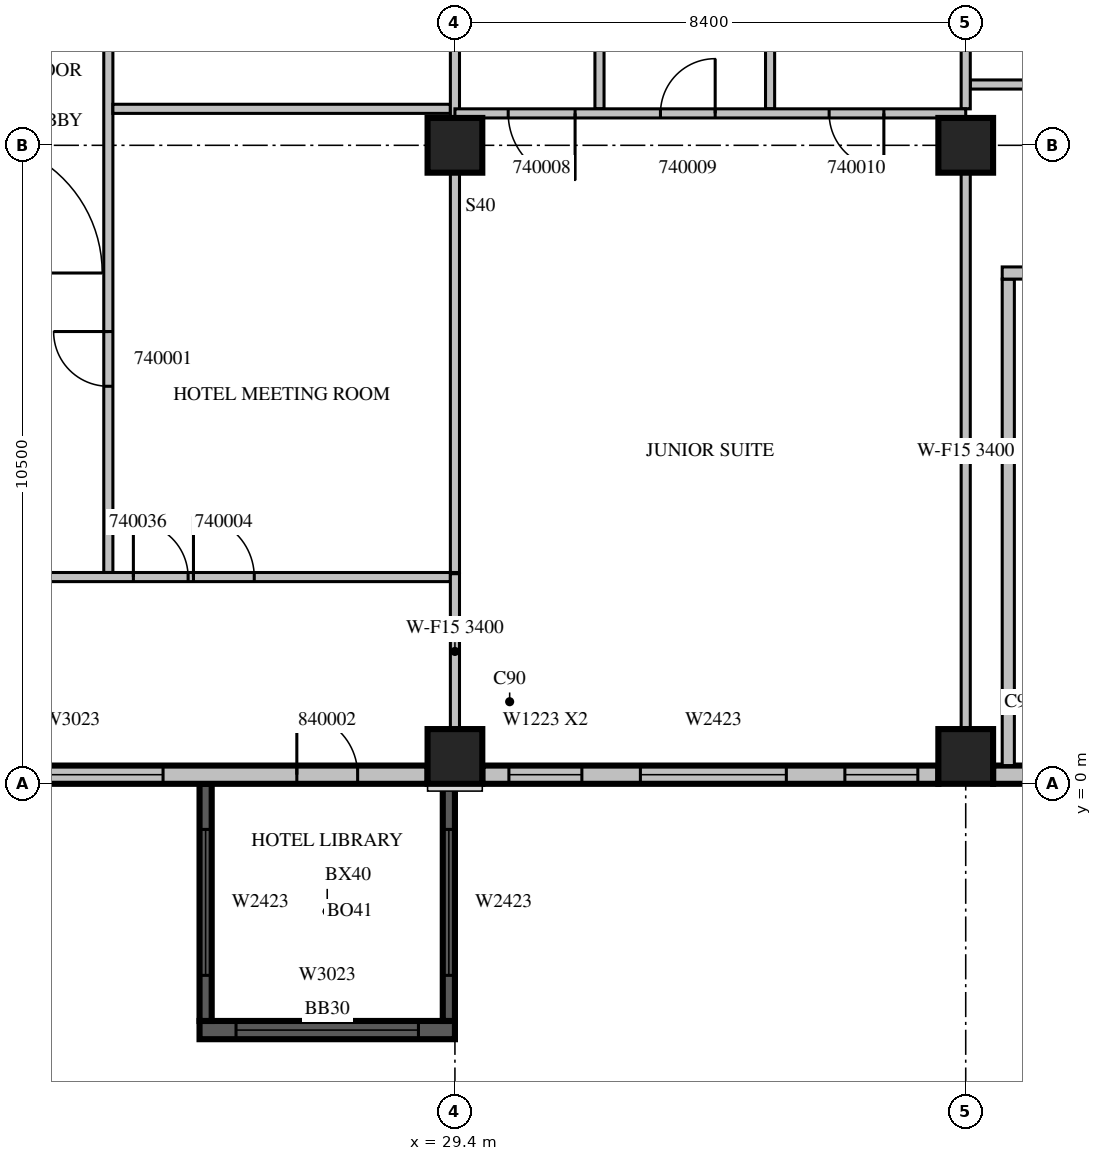
"""IFC4 building model, lengths in metres.
Left out: names, types, materials, properties, quantities, classifications, styles, units other than length and angle.
Written with IfcOpenShell. Run it as: python <this file> out.ifc"""

import sys

from ifc_helpers import new_model, si_unit, direction, frame, frame_2d, origin, origin_2d, place, context, subcontext, project, spatial, rectangle, extrude, source, transform, mapped, element, fill, save


model = new_model("IFC4")
c1 = context("Model", 3, precision=1e-05, world=origin(), true_north=direction((0.0, 1.0)))
c2 = subcontext(c1, "Body", "Model", "MODEL_VIEW")
j1 = project(units=[si_unit("LENGTHUNIT", "METRE"), si_unit("PLANEANGLEUNIT", "RADIAN")], contexts=[c1])
p1 = place(None, origin())
s1 = spatial("IfcSite", under=j1, at=p1, CompositionType="ELEMENT")
p2 = place(p1, origin())
s2 = spatial("IfcBuilding", under=s1, at=p2, CompositionType="ELEMENT")
p3 = place(p2, frame((0.0, 0.0, 185.4)))
s3 = spatial("IfcBuildingStorey", under=s2, at=p3, CompositionType="ELEMENT", Elevation=185.4)
m1 = source(origin(), c2, "Body", "SweptSolid", [
    extrude(rectangle(XDim=0.9, YDim=0.9, at=origin_2d()), origin(), (0.0, 0.0, 1.0), 3.8),
])
for number, where, z_axis, x_axis in (
    (1, (29.4, 0.45, 0.0), (0.0, 0.0, 1.0), (1.0, 0.0, 0.0)),
    (2, (37.8, 0.45, 0.0), (0.0, 0.0, 1.0), (1.0, 0.0, 0.0)),
    (3, (29.4, 10.5, 0.0), (0.0, 0.0, 1.0), (1.0, 0.0, 0.0)),
    (4, (37.8, 10.5, 0.0), (0.0, 0.0, 1.0), (1.0, 0.0, 0.0)),
):
    element("IfcColumn", number, at=place(p3, frame(where, z_axis=z_axis, x_axis=x_axis)), inside=s3, PredefinedType="COLUMN", context=c2, shape_type="MappedRepresentation", body=[
        mapped(m1, transform((0.0, 0.0, 0.0), scale=1.0)),
    ])
m2 = source(origin(), c2, "Body", "SweptSolid", [
    extrude(rectangle(XDim=4.2, YDim=0.3, at=frame_2d((2.1, 0.0))), origin(), (0.0, 0.0, 1.0), 3.4),
])
p4 = place(p3, frame((25.2, -4.05, 0.0), z_axis=(0.0, 0.0, 1.0), x_axis=(1.0, 0.0, 0.0)))
e5 = element("IfcWall", 5, at=p4, inside=s3, PredefinedType="SOLIDWALL", context=c2, shape_type="MappedRepresentation", body=[
    mapped(m2, transform((0.0, 0.0, 0.0), scale=1.0)),
])
m3 = source(origin(), c2, "Body", "SweptSolid", [
    extrude(rectangle(XDim=3.0, YDim=2.3, at=frame_2d((1.5, 1.15))), frame((0.0, 0.16, 0.0), z_axis=(0.0, -1.0, 0.0), x_axis=(1.0, 0.0, 0.0)), (0.0, 0.0, 1.0), 0.32),
])
p5 = place(p4, frame((0.6, 0.0, 0.6)))
e6 = element("IfcOpeningElement", 6, at=p5, cuts=e5, PredefinedType="OPENING", context=c2, shape_type="MappedRepresentation", body=[
    mapped(m3, transform((0.0, 0.0, 0.0), scale=1.0)),
])
m4 = source(origin(), c2, "Body", "SweptSolid", [
    extrude(rectangle(XDim=3.9, YDim=0.2, at=frame_2d((1.95, 0.0))), origin(), (0.0, 0.0, 1.0), 3.4),
])
p6 = place(p3, frame((25.3, 0.0, 0.0), z_axis=(0.0, 0.0, 1.0), x_axis=(0.0, -1.0, 0.0)))
e7 = element("IfcWall", 7, at=p6, inside=s3, PredefinedType="SOLIDWALL", context=c2, shape_type="MappedRepresentation", body=[
    mapped(m4, transform((0.0, 0.0, 0.0), scale=1.0)),
])
m5 = source(origin(), c2, "Body", "SweptSolid", [
    extrude(rectangle(XDim=2.4, YDim=2.3, at=frame_2d((1.2, 1.15))), frame((0.0, 0.11, 0.0), z_axis=(0.0, -1.0, 0.0), x_axis=(1.0, 0.0, 0.0)), (0.0, 0.0, 1.0), 0.22),
])
p7 = place(p6, frame((0.75, 0.0, 0.6)))
e8 = element("IfcOpeningElement", 8, at=p7, cuts=e7, PredefinedType="OPENING", context=c2, shape_type="MappedRepresentation", body=[
    mapped(m5, transform((0.0, 0.0, 0.0), scale=1.0)),
])
p8 = place(p3, frame((29.3, 0.0, 0.0), z_axis=(0.0, 0.0, 1.0), x_axis=(0.0, -1.0, 0.0)))
e9 = element("IfcWall", 9, at=p8, inside=s3, PredefinedType="SOLIDWALL", context=c2, shape_type="MappedRepresentation", body=[
    mapped(m4, transform((0.0, 0.0, 0.0), scale=1.0)),
])
p9 = place(p8, frame((0.75, 0.0, 0.6)))
e10 = element("IfcOpeningElement", 10, at=p9, cuts=e9, PredefinedType="OPENING", context=c2, shape_type="MappedRepresentation", body=[
    mapped(m5, transform((0.0, 0.0, 0.0), scale=1.0)),
])
m6 = source(origin(), c2, "Body", "SweptSolid", [
    extrude(rectangle(XDim=7.5, YDim=0.3, at=frame_2d((3.75, 0.0))), origin(), (0.0, 0.0, 1.0), 3.4),
])
p10 = place(p3, frame((21.45, 0.15, 0.0), z_axis=(0.0, 0.0, 1.0), x_axis=(1.0, 0.0, 0.0)))
e11 = element("IfcWall", 11, at=p10, inside=s3, PredefinedType="STANDARD", context=c2, shape_type="MappedRepresentation", body=[
    mapped(m6, transform((0.0, 0.0, 0.0), scale=1.0)),
])
p11 = place(p10, frame((0.15, 0.0, 0.6)))
e12 = element("IfcOpeningElement", 12, at=p11, cuts=e11, PredefinedType="OPENING", context=c2, shape_type="MappedRepresentation", body=[
    mapped(m3, transform((0.0, 0.0, 0.0), scale=1.0)),
])
m7 = source(origin(), c2, "Body", "SweptSolid", [
    extrude(rectangle(XDim=1.0, YDim=2.1, at=frame_2d((0.5, 1.05))), frame((0.0, 0.16, 0.0), z_axis=(0.0, -1.0, 0.0), x_axis=(1.0, 0.0, 0.0)), (0.0, 0.0, 1.0), 0.32),
])
p12 = place(p10, frame((5.35, 0.0, 0.0)))
e13 = element("IfcOpeningElement", 13, at=p12, cuts=e11, PredefinedType="OPENING", context=c2, shape_type="MappedRepresentation", body=[
    mapped(m7, transform((0.0, 0.0, 0.0), scale=1.0)),
])
p13 = place(p3, frame((29.85, 0.15, 0.0), z_axis=(0.0, 0.0, 1.0), x_axis=(1.0, 0.0, 0.0)))
e14 = element("IfcWall", 14, at=p13, inside=s3, PredefinedType="STANDARD", context=c2, shape_type="MappedRepresentation", body=[
    mapped(m6, transform((0.0, 0.0, 0.0), scale=1.0)),
])
m8 = source(origin(), c2, "Body", "SweptSolid", [
    extrude(rectangle(XDim=1.2, YDim=2.3, at=frame_2d((0.6, 1.15))), frame((0.0, 0.16, 0.0), z_axis=(0.0, -1.0, 0.0), x_axis=(1.0, 0.0, 0.0)), (0.0, 0.0, 1.0), 0.32),
])
p14 = place(p13, frame((0.438, 0.0, 0.6)))
e15 = element("IfcOpeningElement", 15, at=p14, cuts=e14, PredefinedType="OPENING", context=c2, shape_type="MappedRepresentation", body=[
    mapped(m8, transform((0.0, 0.0, 0.0), scale=1.0)),
])
p15 = place(p13, frame((5.963, 0.0, 0.6)))
e16 = element("IfcOpeningElement", 16, at=p15, cuts=e14, PredefinedType="OPENING", context=c2, shape_type="MappedRepresentation", body=[
    mapped(m8, transform((0.0, 0.0, 0.0), scale=1.0)),
])
m9 = source(origin(), c2, "Body", "SweptSolid", [
    extrude(rectangle(XDim=2.4, YDim=2.3, at=frame_2d((1.2, 1.15))), frame((0.0, 0.16, 0.0), z_axis=(0.0, -1.0, 0.0), x_axis=(1.0, 0.0, 0.0)), (0.0, 0.0, 1.0), 0.32),
])
p16 = place(p13, frame((2.6, 0.0, 0.6)))
e17 = element("IfcOpeningElement", 17, at=p16, cuts=e14, PredefinedType="OPENING", context=c2, shape_type="MappedRepresentation", body=[
    mapped(m9, transform((0.0, 0.0, 0.0), scale=1.0)),
])
m10 = source(origin(), c2, "Body", "SweptSolid", [
    extrude(rectangle(XDim=1.95, YDim=0.3, at=frame_2d((0.975, 0.0))), origin(), (0.0, 0.0, 1.0), 3.4),
])
p17 = place(p3, frame((38.25, 0.15, 0.0), z_axis=(0.0, 0.0, 1.0), x_axis=(1.0, 0.0, 0.0)))
e18 = element("IfcWall", 18, at=p17, inside=s3, PredefinedType="STANDARD", context=c2, shape_type="MappedRepresentation", body=[
    mapped(m10, transform((0.0, 0.0, 0.0), scale=1.0)),
])
m11 = source(origin(), c2, "Body", "SweptSolid", [
    extrude(rectangle(XDim=8.0, YDim=0.2, at=frame_2d((4.0, 0.0))), origin(), (0.0, 0.0, 1.0), 3.4),
])
p18 = place(p3, frame((38.5, 0.3, 0.0), z_axis=(0.0, 0.0, 1.0), x_axis=(0.0, 1.0, 0.0)))
e19 = element("IfcWall", 19, at=p18, inside=s3, PredefinedType="PARTITIONING", context=c2, shape_type="MappedRepresentation", body=[
    mapped(m11, transform((0.0, 0.0, 0.0), scale=1.0)),
])
m12 = source(origin(), c2, "Body", "SweptSolid", [
    extrude(rectangle(XDim=5.45, YDim=0.2, at=frame_2d((2.725, 0.0))), origin(), (0.0, 0.0, 1.0), 3.4),
])
p19 = place(p3, frame((38.4, 8.4, 0.0), z_axis=(0.0, 0.0, 1.0), x_axis=(1.0, 0.0, 0.0)))
e20 = element("IfcWall", 20, at=p19, inside=s3, PredefinedType="PARTITIONING", context=c2, shape_type="MappedRepresentation", body=[
    mapped(m12, transform((0.0, 0.0, 0.0), scale=1.0)),
])
m13 = source(origin(), c2, "Body", "SweptSolid", [
    extrude(rectangle(XDim=1.2, YDim=2.1, at=frame_2d((0.6, 1.05))), frame((0.0, 0.11, 0.0), z_axis=(0.0, -1.0, 0.0), x_axis=(1.0, 0.0, 0.0)), (0.0, 0.0, 1.0), 0.22),
])
p20 = place(p19, frame((0.4, 0.0, 0.0)))
e21 = element("IfcOpeningElement", 21, at=p20, cuts=e20, PredefinedType="OPENING", context=c2, shape_type="MappedRepresentation", body=[
    mapped(m13, transform((0.0, 0.0, 0.0), scale=1.0)),
])
m14 = source(origin(), c2, "Body", "SweptSolid", [
    extrude(rectangle(XDim=0.9, YDim=2.1, at=frame_2d((0.45, 1.05))), frame((0.0, 0.11, 0.0), z_axis=(0.0, -1.0, 0.0), x_axis=(1.0, 0.0, 0.0)), (0.0, 0.0, 1.0), 0.22),
])
p21 = place(p19, frame((3.25, 0.0, 0.0)))
e22 = element("IfcOpeningElement", 22, at=p21, cuts=e20, PredefinedType="OPENING", context=c2, shape_type="MappedRepresentation", body=[
    mapped(m14, transform((0.0, 0.0, 0.0), scale=1.0)),
])
m15 = source(origin(), c2, "Body", "SweptSolid", [
    extrude(rectangle(XDim=11.525, YDim=0.15, at=frame_2d((5.763, 0.0))), origin(), (0.0, 0.0, 1.0), 3.4),
])
p22 = place(p3, frame((23.7, 15.0, 0.0), z_axis=(0.0, 0.0, 1.0), x_axis=(0.0, -1.0, 0.0)))
e23 = element("IfcWall", 23, at=p22, inside=s3, PredefinedType="PARTITIONING", context=c2, shape_type="MappedRepresentation", body=[
    mapped(m15, transform((0.0, 0.0, 0.0), scale=1.0)),
])
m16 = source(origin(), c2, "Body", "SweptSolid", [
    extrude(rectangle(XDim=0.9, YDim=2.1, at=frame_2d((0.45, 1.05))), frame((0.0, 0.085, 0.0), z_axis=(0.0, -1.0, 0.0), x_axis=(1.0, 0.0, 0.0)), (0.0, 0.0, 1.0), 0.17),
])
p23 = place(p22, frame((7.562, 0.0, 0.0)))
e24 = element("IfcOpeningElement", 24, at=p23, cuts=e23, PredefinedType="OPENING", context=c2, shape_type="MappedRepresentation", body=[
    mapped(m16, transform((0.0, 0.0, 0.0), scale=1.0)),
])
p24 = place(p22, frame((0.925, 0.0, 0.0)))
e25 = element("IfcOpeningElement", 25, at=p24, cuts=e23, PredefinedType="OPENING", context=c2, shape_type="MappedRepresentation", body=[
    mapped(m16, transform((0.0, 0.0, 0.0), scale=1.0)),
])
m17 = source(origin(), c2, "Body", "SweptSolid", [
    extrude(rectangle(XDim=5.55, YDim=0.15, at=frame_2d((2.775, 0.0))), origin(), (0.0, 0.0, 1.0), 3.4),
])
p25 = place(p3, frame((29.325, 11.1, 0.0), z_axis=(0.0, 0.0, 1.0), x_axis=(-1.0, 0.0, 0.0)))
e26 = element("IfcWall", 26, at=p25, inside=s3, PredefinedType="PARTITIONING", context=c2, shape_type="MappedRepresentation", body=[
    mapped(m17, transform((0.0, 0.0, 0.0), scale=1.0)),
])
m18 = source(origin(), c2, "Body", "SweptSolid", [
    extrude(rectangle(XDim=6.576, YDim=0.15, at=frame_2d((3.288, 0.0))), origin(), (0.0, 0.0, 1.0), 3.4),
])
p26 = place(p3, frame((29.4, 3.475, 0.0), z_axis=(0.0, 0.0, 1.0), x_axis=(0.0, 1.0, 0.0)))
e27 = element("IfcWall", 27, at=p26, inside=s3, PredefinedType="PARTITIONING", context=c2, shape_type="MappedRepresentation", body=[
    mapped(m18, transform((0.0, 0.0, 0.0), scale=1.0)),
])
m19 = source(origin(), c2, "Body", "SweptSolid", [
    extrude(rectangle(XDim=4.051, YDim=0.15, at=frame_2d((2.026, 0.0))), origin(), (0.0, 0.0, 1.0), 3.4),
])
p27 = place(p3, frame((29.4, 10.949, 0.0), z_axis=(0.0, 0.0, 1.0), x_axis=(0.0, 1.0, 0.0)))
e28 = element("IfcWall", 28, at=p27, inside=s3, PredefinedType="PARTITIONING", context=c2, shape_type="MappedRepresentation", body=[
    mapped(m19, transform((0.0, 0.0, 0.0), scale=1.0)),
])
m20 = source(origin(), c2, "Body", "SweptSolid", [
    extrude(rectangle(XDim=7.525, YDim=0.15, at=frame_2d((3.763, 0.0))), origin(), (0.0, 0.0, 1.0), 3.4),
])
p28 = place(p3, frame((21.8, 3.4, 0.0), z_axis=(0.0, 0.0, 1.0), x_axis=(1.0, 0.0, 0.0)))
e29 = element("IfcWall", 29, at=p28, inside=s3, PredefinedType="PARTITIONING", context=c2, shape_type="MappedRepresentation", body=[
    mapped(m20, transform((0.0, 0.0, 0.0), scale=1.0)),
])
m21 = source(origin(), c2, "Body", "SweptSolid", [
    extrude(rectangle(XDim=1.0, YDim=2.1, at=frame_2d((0.5, 1.05))), frame((0.0, 0.085, 0.0), z_axis=(0.0, -1.0, 0.0), x_axis=(1.0, 0.0, 0.0)), (0.0, 0.0, 1.0), 0.17),
])
p29 = place(p28, frame((3.3, 0.0, 0.0)))
e30 = element("IfcOpeningElement", 30, at=p29, cuts=e29, PredefinedType="OPENING", context=c2, shape_type="MappedRepresentation", body=[
    mapped(m21, transform((0.0, 0.0, 0.0), scale=1.0)),
])
p30 = place(p28, frame((2.312, 0.0, 0.0)))
e31 = element("IfcOpeningElement", 31, at=p30, cuts=e29, PredefinedType="OPENING", context=c2, shape_type="MappedRepresentation", body=[
    mapped(m16, transform((0.0, 0.0, 0.0), scale=1.0)),
])
m22 = source(origin(), c2, "Body", "SweptSolid", [
    extrude(rectangle(XDim=6.45, YDim=0.15, at=frame_2d((3.225, 0.0))), origin(), (0.0, 0.0, 1.0), 3.4),
])
p31 = place(p3, frame((37.875, 11.5, 0.0), z_axis=(0.0, 0.0, 1.0), x_axis=(1.0, 0.0, 0.0)))
e32 = element("IfcWall", 32, at=p31, inside=s3, PredefinedType="PARTITIONING", context=c2, shape_type="MappedRepresentation", body=[
    mapped(m22, transform((0.0, 0.0, 0.0), scale=1.0)),
])
m23 = source(origin(), c2, "Body", "SweptSolid", [
    extrude(rectangle(XDim=3.9, YDim=0.15, at=frame_2d((1.95, 0.0))), origin(), (0.0, 0.0, 1.0), 3.4),
])
for number, where, z_axis, x_axis in (
    (33, (31.777, 11.1, 0.0), (0.0, 0.0, 1.0), (0.0, 1.0, 0.0)),
    (34, (34.583, 11.1, 0.0), (0.0, 0.0, 1.0), (0.0, 1.0, 0.0)),
):
    element("IfcWall", number, at=place(p3, frame(where, z_axis=z_axis, x_axis=x_axis)), inside=s3, PredefinedType="PARTITIONING", context=c2, shape_type="MappedRepresentation", body=[
        mapped(m23, transform((0.0, 0.0, 0.0), scale=1.0)),
    ])
m24 = source(origin(), c2, "Body", "SweptSolid", [
    extrude(rectangle(XDim=2.556, YDim=0.15, at=frame_2d((1.278, 0.0))), origin(), (0.0, 0.0, 1.0), 3.4),
])
p32 = place(p3, frame((29.4, 0.899, 0.0), z_axis=(0.0, 0.0, 1.0), x_axis=(0.0, 1.0, 0.0)))
e35 = element("IfcWall", 35, at=p32, inside=s3, PredefinedType="PARTITIONING", context=c2, shape_type="MappedRepresentation", body=[
    mapped(m24, transform((0.0, 0.0, 0.0), scale=1.0)),
])
m25 = source(origin(), c2, "Body", "SweptSolid", [
    extrude(rectangle(XDim=9.152, YDim=0.15, at=frame_2d((4.576, 0.0))), origin(), (0.0, 0.0, 1.0), 3.4),
])
p33 = place(p3, frame((37.8, 0.899, 0.0), z_axis=(0.0, 0.0, 1.0), x_axis=(0.0, 1.0, 0.0)))
e36 = element("IfcWall", 36, at=p33, inside=s3, PredefinedType="PARTITIONING", context=c2, shape_type="MappedRepresentation", body=[
    mapped(m25, transform((0.0, 0.0, 0.0), scale=1.0)),
])
p34 = place(p3, frame((37.8, 11.1, 0.0), z_axis=(0.0, 0.0, 1.0), x_axis=(0.0, 1.0, 0.0)))
e37 = element("IfcWall", 37, at=p34, inside=s3, PredefinedType="PARTITIONING", context=c2, shape_type="MappedRepresentation", body=[
    mapped(m23, transform((0.0, 0.0, 0.0), scale=1.0)),
])
m26 = source(origin(), c2, "Body", "SweptSolid", [
    extrude(rectangle(XDim=8.4, YDim=0.15, at=frame_2d((4.2, 0.0))), origin(), (0.0, 0.0, 1.0), 3.4),
])
p35 = place(p3, frame((37.8, 11.025, 0.0), z_axis=(0.0, 0.0, 1.0), x_axis=(-1.0, 0.0, 0.0)))
e38 = element("IfcWall", 38, at=p35, inside=s3, PredefinedType="PARTITIONING", context=c2, shape_type="MappedRepresentation", body=[
    mapped(m26, transform((0.0, 0.0, 0.0), scale=1.0)),
])
m27 = source(origin(), c2, "Body", "SweptSolid", [
    extrude(rectangle(XDim=1.1, YDim=2.1, at=frame_2d((0.55, 1.05))), frame((0.0, 0.085, 0.0), z_axis=(0.0, -1.0, 0.0), x_axis=(1.0, 0.0, 0.0)), (0.0, 0.0, 1.0), 0.17),
])
p36 = place(p35, frame((6.424, 0.0, 0.0)))
e39 = element("IfcOpeningElement", 39, at=p36, cuts=e38, PredefinedType="OPENING", context=c2, shape_type="MappedRepresentation", body=[
    mapped(m27, transform((0.0, 0.0, 0.0), scale=1.0)),
])
p37 = place(p35, frame((4.12, 0.0, 0.0)))
e40 = element("IfcOpeningElement", 40, at=p37, cuts=e38, PredefinedType="OPENING", context=c2, shape_type="MappedRepresentation", body=[
    mapped(m16, transform((0.0, 0.0, 0.0), scale=1.0)),
])
p38 = place(p35, frame((1.346, 0.0, 0.0)))
e41 = element("IfcOpeningElement", 41, at=p38, cuts=e38, PredefinedType="OPENING", context=c2, shape_type="MappedRepresentation", body=[
    mapped(m16, transform((0.0, 0.0, 0.0), scale=1.0)),
])
m28 = source(origin(), c2, "Body", "SweptSolid", [
    extrude(rectangle(XDim=3.0, YDim=2.3, at=frame_2d((1.5, 1.15))), frame((0.0, 0.03, 0.0), z_axis=(0.0, -1.0, 0.0), x_axis=(1.0, 0.0, 0.0)), (0.0, 0.0, 1.0), 0.06),
])
p39 = place(p5, origin())
e42 = element("IfcWindow", 42, at=p39, inside=s3, PartitioningType="SINGLE_PANEL", PredefinedType="WINDOW", context=c2, shape_type="MappedRepresentation", body=[
    mapped(m28, transform((0.0, 0.0, 0.0), scale=1.0)),
])
fill(e6, e42)
m29 = source(origin(), c2, "Body", "SweptSolid", [
    extrude(rectangle(XDim=2.4, YDim=2.3, at=frame_2d((1.2, 1.15))), frame((0.0, 0.03, 0.0), z_axis=(0.0, -1.0, 0.0), x_axis=(1.0, 0.0, 0.0)), (0.0, 0.0, 1.0), 0.06),
])
p40 = place(p7, origin())
e43 = element("IfcWindow", 43, at=p40, inside=s3, PartitioningType="SINGLE_PANEL", PredefinedType="WINDOW", context=c2, shape_type="MappedRepresentation", body=[
    mapped(m29, transform((0.0, 0.0, 0.0), scale=1.0)),
])
fill(e8, e43)
p41 = place(p9, origin())
e44 = element("IfcWindow", 44, at=p41, inside=s3, PartitioningType="SINGLE_PANEL", PredefinedType="WINDOW", context=c2, shape_type="MappedRepresentation", body=[
    mapped(m29, transform((0.0, 0.0, 0.0), scale=1.0)),
])
fill(e10, e44)
p42 = place(p11, origin())
e45 = element("IfcWindow", 45, at=p42, inside=s3, PartitioningType="SINGLE_PANEL", PredefinedType="WINDOW", context=c2, shape_type="MappedRepresentation", body=[
    mapped(m28, transform((0.0, 0.0, 0.0), scale=1.0)),
])
fill(e12, e45)
m30 = source(origin(), c2, "Body", "SweptSolid", [
    extrude(rectangle(XDim=1.2, YDim=2.3, at=frame_2d((0.6, 1.15))), frame((0.0, 0.03, 0.0), z_axis=(0.0, -1.0, 0.0), x_axis=(1.0, 0.0, 0.0)), (0.0, 0.0, 1.0), 0.06),
])
p43 = place(p14, origin())
e46 = element("IfcWindow", 46, at=p43, inside=s3, PartitioningType="SINGLE_PANEL", PredefinedType="WINDOW", context=c2, shape_type="MappedRepresentation", body=[
    mapped(m30, transform((0.0, 0.0, 0.0), scale=1.0)),
])
fill(e15, e46)
p44 = place(p15, origin())
e47 = element("IfcWindow", 47, at=p44, inside=s3, PartitioningType="SINGLE_PANEL", PredefinedType="WINDOW", context=c2, shape_type="MappedRepresentation", body=[
    mapped(m30, transform((0.0, 0.0, 0.0), scale=1.0)),
])
fill(e16, e47)
p45 = place(p16, origin())
e48 = element("IfcWindow", 48, at=p45, inside=s3, PartitioningType="SINGLE_PANEL", PredefinedType="WINDOW", context=c2, shape_type="MappedRepresentation", body=[
    mapped(m29, transform((0.0, 0.0, 0.0), scale=1.0)),
])
fill(e17, e48)
m31 = source(origin(), c2, "Body", "SweptSolid", [
    extrude(rectangle(XDim=0.9, YDim=2.1, at=frame_2d((0.45, 1.05))), frame((0.0, 0.025, 0.0), z_axis=(0.0, -1.0, 0.0), x_axis=(1.0, 0.0, 0.0)), (0.0, 0.0, 1.0), 0.05),
])
p46 = place(p23, origin())
e49 = element("IfcDoor", 49, at=p46, inside=s3, OperationType="SINGLE_SWING_RIGHT", PredefinedType="DOOR", context=c2, shape_type="MappedRepresentation", body=[
    mapped(m31, transform((0.0, 0.0, 0.0), scale=1.0)),
])
fill(e24, e49)
m32 = source(origin(), c2, "Body", "SweptSolid", [
    extrude(rectangle(XDim=1.0, YDim=2.1, at=frame_2d((0.5, 1.05))), frame((0.0, 0.025, 0.0), z_axis=(0.0, -1.0, 0.0), x_axis=(1.0, 0.0, 0.0)), (0.0, 0.0, 1.0), 0.05),
])
p47 = place(p29, origin())
e50 = element("IfcDoor", 50, at=p47, inside=s3, OperationType="SINGLE_SWING_LEFT", PredefinedType="DOOR", context=c2, shape_type="MappedRepresentation", body=[
    mapped(m32, transform((0.0, 0.0, 0.0), scale=1.0)),
])
fill(e30, e50)
m33 = source(origin(), c2, "Body", "SweptSolid", [
    extrude(rectangle(XDim=1.1, YDim=2.1, at=frame_2d((0.55, 1.05))), frame((0.0, 0.025, 0.0), z_axis=(0.0, -1.0, 0.0), x_axis=(1.0, 0.0, 0.0)), (0.0, 0.0, 1.0), 0.05),
])
p48 = place(p36, origin())
e51 = element("IfcDoor", 51, at=p48, inside=s3, OperationType="SINGLE_SWING_LEFT", PredefinedType="DOOR", context=c2, shape_type="MappedRepresentation", body=[
    mapped(m33, transform((0.0, 0.0, 0.0), scale=1.0)),
])
fill(e39, e51)
p49 = place(p37, origin())
e52 = element("IfcDoor", 52, at=p49, inside=s3, OperationType="SINGLE_SWING_RIGHT", PredefinedType="DOOR", context=c2, shape_type="MappedRepresentation", body=[
    mapped(m31, transform((0.0, 0.0, 0.0), scale=1.0)),
])
fill(e40, e52)
p50 = place(p38, origin())
e53 = element("IfcDoor", 53, at=p50, inside=s3, OperationType="SINGLE_SWING_LEFT", PredefinedType="DOOR", context=c2, shape_type="MappedRepresentation", body=[
    mapped(m31, transform((0.0, 0.0, 0.0), scale=1.0)),
])
fill(e41, e53)
p51 = place(p30, origin())
e54 = element("IfcDoor", 54, at=p51, inside=s3, OperationType="SINGLE_SWING_LEFT", PredefinedType="DOOR", context=c2, shape_type="MappedRepresentation", body=[
    mapped(m31, transform((0.0, 0.0, 0.0), scale=1.0)),
])
fill(e31, e54)
p52 = place(p12, origin())
e55 = element("IfcDoor", 55, at=p52, inside=s3, OperationType="SINGLE_SWING_LEFT", PredefinedType="DOOR", context=c2, shape_type="MappedRepresentation", body=[
    mapped(m32, transform((0.0, 0.0, 0.0), scale=1.0)),
])
fill(e13, e55)
save(model, sys.argv[1])
